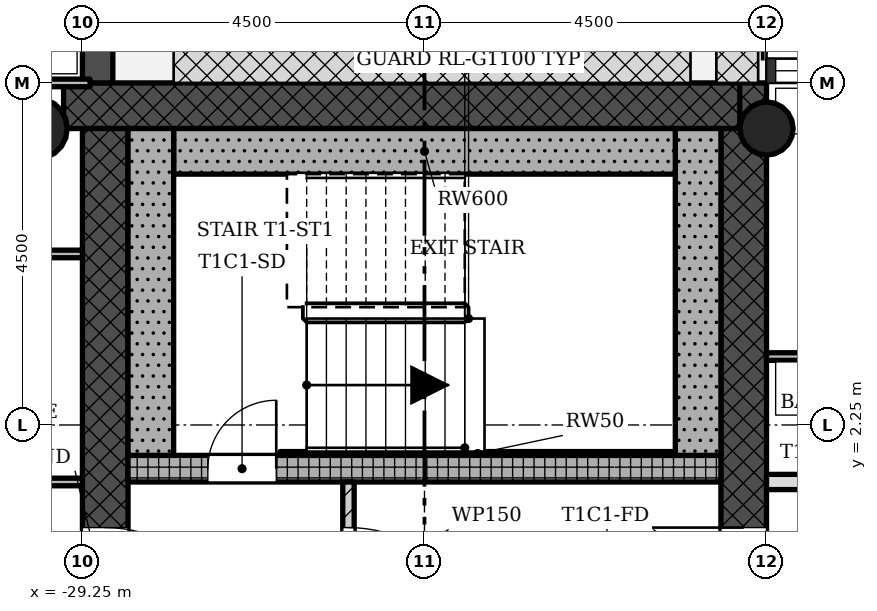
"""IFC4 building model, lengths in metres.
Left out: names, types, materials, properties, quantities, classifications, styles, units other than length and angle.
Written with IfcOpenShell. Run it as: python <this file> out.ifc"""

import sys

from ifc_helpers import new_model, si_unit, direction, frame, frame_2d, origin, origin_2d, place, context, subcontext, project, spatial, rectangle, hollow_circle, extrude, element, fill, save


model = new_model("IFC4")
c1 = context("Model", 3, precision=1e-05, world=origin(), true_north=direction((0.0, 1.0)))
c2 = subcontext(c1, "Body", "Model", "MODEL_VIEW")
j1 = project(units=[si_unit("LENGTHUNIT", "METRE"), si_unit("PLANEANGLEUNIT", "RADIAN")], contexts=[c1])
p1 = place(None, origin())
s1 = spatial("IfcSite", under=j1, at=p1, CompositionType="ELEMENT")
p2 = place(p1, origin())
s2 = spatial("IfcBuilding", under=s1, at=p2, CompositionType="ELEMENT")
p3 = place(p2, frame((0.0, 0.0, 206.2)))
s3 = spatial("IfcBuildingStorey", under=s2, at=p3, CompositionType="ELEMENT", Elevation=206.2)
p4 = place(p3, frame((-20.55, -6.15, 0.0), z_axis=(0.0, 0.0, 1.0), x_axis=(0.0, 1.0, 0.0)))
e1 = element("IfcWall", 1, at=p4, inside=s3, PredefinedType="SHEAR", context=c2, shape_type="SweptSolid", body=[
    extrude(rectangle(XDim=12.9, YDim=0.6, at=frame_2d((6.45, 0.0))), origin(), (0.0, 0.0, 1.0), 3.4),
])
p5 = place(p4, frame((5.25, 0.0, 0.0)))
e2 = element("IfcOpeningElement", 2, at=p5, cuts=e1, PredefinedType="OPENING", context=c2, shape_type="SweptSolid", body=[
    extrude(rectangle(XDim=1.8, YDim=2.1, at=frame_2d((0.9, 1.05))), frame((0.0, 0.31, 0.0), z_axis=(0.0, -1.0, 0.0), x_axis=(1.0, 0.0, 0.0)), (0.0, 0.0, 1.0), 0.62),
])
p6 = place(p3, frame((-20.602, 6.45, 0.0), z_axis=(0.0, 0.0, 1.0), x_axis=(-1.0, 0.0, 0.0)))
e3 = element("IfcWall", 3, at=p6, inside=s3, PredefinedType="SHEAR", context=c2, shape_type="SweptSolid", body=[
    extrude(rectangle(XDim=8.896, YDim=0.6, at=frame_2d((4.448, 0.0))), origin(), (0.0, 0.0, 1.0), 3.4),
])
p7 = place(p3, frame((-28.95, 6.15, 0.0), z_axis=(0.0, 0.0, 1.0), x_axis=(0.0, -1.0, 0.0)))
e4 = element("IfcWall", 4, at=p7, inside=s3, PredefinedType="SHEAR", context=c2, shape_type="SweptSolid", body=[
    extrude(rectangle(XDim=12.9, YDim=0.6, at=frame_2d((6.45, 0.0))), origin(), (0.0, 0.0, 1.0), 3.4),
])
p8 = place(p7, frame((5.25, 0.0, 0.0)))
e5 = element("IfcOpeningElement", 5, at=p8, cuts=e4, PredefinedType="OPENING", context=c2, shape_type="SweptSolid", body=[
    extrude(rectangle(XDim=1.8, YDim=2.1, at=frame_2d((0.9, 1.05))), frame((0.0, 0.31, 0.0), z_axis=(0.0, -1.0, 0.0), x_axis=(1.0, 0.0, 0.0)), (0.0, 0.0, 1.0), 0.62),
])
p9 = place(p3, frame((-28.65, 1.675, 0.0), z_axis=(0.0, 0.0, 1.0), x_axis=(1.0, 0.0, 0.0)))
e6 = element("IfcWall", 6, at=p9, inside=s3, PredefinedType="SHEAR", context=c2, shape_type="SweptSolid", body=[
    extrude(rectangle(XDim=7.8, YDim=0.35, at=frame_2d((3.9, 0.0))), origin(), (0.0, 0.0, 1.0), 3.4),
])
p10 = place(p9, frame((1.05, 0.0, 0.0)))
e7 = element("IfcOpeningElement", 7, at=p10, cuts=e6, PredefinedType="OPENING", context=c2, shape_type="SweptSolid", body=[
    extrude(rectangle(XDim=0.9, YDim=2.1, at=frame_2d((0.45, 1.05))), frame((0.0, 0.185, 0.0), z_axis=(0.0, -1.0, 0.0), x_axis=(1.0, 0.0, 0.0)), (0.0, 0.0, 1.0), 0.37),
])
p11 = place(p3, frame((-20.25, 6.15, 0.0), z_axis=(0.0, 0.0, 1.0), x_axis=(1.0, 0.0, 0.0)))
e8 = element("IfcColumn", 8, at=p11, inside=s3, PredefinedType="COLUMN", context=c2, shape_type="SweptSolid", body=[
    extrude(hollow_circle(Radius=0.35, WallThickness=0.025, at=origin_2d()), origin(), (0.0, 0.0, 1.0), 3.4),
])
p12 = place(p3, frame((-29.85, 6.15, 0.0), z_axis=(0.0, 0.0, 1.0), x_axis=(1.0, 0.0, 0.0)))
e9 = element("IfcColumn", 9, at=p12, inside=s3, PredefinedType="COLUMN", context=c2, shape_type="SweptSolid", body=[
    extrude(hollow_circle(Radius=0.4, WallThickness=0.028, at=origin_2d()), origin(), (0.0, 0.0, 1.0), 3.4),
])
p13 = place(p3, frame((-29.05, 6.75, -0.02), z_axis=(0.0, 0.0, 1.0), x_axis=(0.0, 1.0, 0.0)))
e10 = element("IfcWall", 10, at=p13, inside=s3, PredefinedType="STANDARD", context=c2, shape_type="SweptSolid", body=[
    extrude(rectangle(XDim=4.5, YDim=0.4, at=frame_2d((2.25, 0.0))), origin(), (0.0, 0.0, 1.0), 3.12),
])
p14 = place(p13, frame((1.35, 0.0, 0.02)))
e11 = element("IfcOpeningElement", 11, at=p14, cuts=e10, PredefinedType="OPENING", context=c2, shape_type="SweptSolid", body=[
    extrude(rectangle(XDim=1.8, YDim=2.1, at=frame_2d((0.9, 1.05))), frame((0.0, 0.21, 0.0), z_axis=(0.0, -1.0, 0.0), x_axis=(1.0, 0.0, 0.0)), (0.0, 0.0, 1.0), 0.42),
])
p15 = place(p3, frame((-25.75, -1.5, 0.0), z_axis=(0.0, 0.0, 1.0), x_axis=(0.0, 1.0, 0.0)))
e12 = element("IfcWall", 12, at=p15, inside=s3, PredefinedType="PARTITIONING", context=c2, shape_type="SweptSolid", body=[
    extrude(rectangle(XDim=3.0, YDim=0.15, at=frame_2d((1.5, 0.0))), origin(), (0.0, 0.0, 1.0), 3.0),
])
p16 = place(p15, frame((0.6, 0.0, 0.0)))
e13 = element("IfcOpeningElement", 13, at=p16, cuts=e12, PredefinedType="OPENING", context=c2, shape_type="SweptSolid", body=[
    extrude(rectangle(XDim=1.8, YDim=2.1, at=frame_2d((0.9, 1.05))), frame((0.0, 0.085, 0.0), z_axis=(0.0, -1.0, 0.0), x_axis=(1.0, 0.0, 0.0)), (0.0, 0.0, 1.0), 0.17),
])
p17 = place(p3, frame((-31.5, 1.5, 0.0), z_axis=(0.0, 0.0, 1.0), x_axis=(1.0, 0.0, 0.0)))
e14 = element("IfcWall", 14, at=p17, inside=s3, PredefinedType="PARTITIONING", context=c2, shape_type="SweptSolid", body=[
    extrude(rectangle(XDim=2.25, YDim=0.1, at=frame_2d((1.125, 0.0))), origin(), (0.0, 0.0, 1.0), 3.0),
])
p18 = place(p3, frame((-20.25, 1.5, 0.0), z_axis=(0.0, 0.0, 1.0), x_axis=(1.0, 0.0, 0.0)))
e15 = element("IfcWall", 15, at=p18, inside=s3, PredefinedType="SOLIDWALL", context=c2, shape_type="SweptSolid", body=[
    extrude(rectangle(XDim=4.5, YDim=0.2, at=frame_2d((2.25, 0.0))), origin(), (0.0, 0.0, 1.0), 3.0),
])
p19 = place(p18, frame((3.0, 0.0, 0.0)))
e16 = element("IfcOpeningElement", 16, at=p19, cuts=e15, PredefinedType="OPENING", context=c2, shape_type="SweptSolid", body=[
    extrude(rectangle(XDim=0.9, YDim=2.1, at=frame_2d((0.45, 1.05))), frame((0.0, 0.11, 0.0), z_axis=(0.0, -1.0, 0.0), x_axis=(1.0, 0.0, 0.0)), (0.0, 0.0, 1.0), 0.22),
])
p20 = place(p3, frame((-20.25, 3.15, 0.0), z_axis=(0.0, 0.0, 1.0), x_axis=(1.0, 0.0, 0.0)))
e17 = element("IfcWall", 17, at=p20, inside=s3, PredefinedType="PARTITIONING", context=c2, shape_type="SweptSolid", body=[
    extrude(rectangle(XDim=4.5, YDim=0.1, at=frame_2d((2.25, 0.0))), origin(), (0.0, 0.0, 1.0), 3.0),
])
p21 = place(p20, frame((3.0, 0.0, 0.0)))
e18 = element("IfcOpeningElement", 18, at=p21, cuts=e17, PredefinedType="OPENING", context=c2, shape_type="SweptSolid", body=[
    extrude(rectangle(XDim=0.9, YDim=2.1, at=frame_2d((0.45, 1.05))), frame((0.0, 0.06, 0.0), z_axis=(0.0, -1.0, 0.0), x_axis=(1.0, 0.0, 0.0)), (0.0, 0.0, 1.0), 0.12),
])
p22 = place(p3, frame((-35.1, 4.5, 0.0), z_axis=(0.0, 0.0, 1.0), x_axis=(1.0, 0.0, 0.0)))
e19 = element("IfcWall", 19, at=p22, inside=s3, PredefinedType="PARTITIONING", context=c2, shape_type="SweptSolid", body=[
    extrude(rectangle(XDim=5.85, YDim=0.1, at=frame_2d((2.925, 0.0))), origin(), (0.0, 0.0, 1.0), 3.0),
])
p23 = place(p22, frame((1.35, 0.0, 0.0)))
e20 = element("IfcOpeningElement", 20, at=p23, cuts=e19, PredefinedType="OPENING", context=c2, shape_type="SweptSolid", body=[
    extrude(rectangle(XDim=0.9, YDim=2.1, at=frame_2d((0.45, 1.05))), frame((0.0, 0.06, 0.0), z_axis=(0.0, -1.0, 0.0), x_axis=(1.0, 0.0, 0.0)), (0.0, 0.0, 1.0), 0.12),
])
p24 = place(p3, frame((-35.1, 6.75, 0.0), z_axis=(0.0, 0.0, 1.0), x_axis=(1.0, 0.0, 0.0)))
e21 = element("IfcWall", 21, at=p24, inside=s3, PredefinedType="PARTITIONING", context=c2, shape_type="SweptSolid", body=[
    extrude(rectangle(XDim=5.95, YDim=0.1, at=frame_2d((2.975, 0.0))), origin(), (0.0, 0.0, 1.0), 3.0),
])
p25 = place(p3, frame((-21.15, 1.85, 0.0), z_axis=(0.0, 0.0, 1.0), x_axis=(0.0, 1.0, 0.0)))
e22 = element("IfcWall", 22, at=p25, inside=s3, PredefinedType="SHEAR", context=c2, shape_type="SweptSolid", body=[
    extrude(rectangle(XDim=4.3, YDim=0.6, at=frame_2d((2.15, 0.0))), origin(), (0.0, 0.0, 1.0), 3.4),
])
p26 = place(p3, frame((-28.05, 5.85, 0.0), z_axis=(0.0, 0.0, 1.0), x_axis=(1.0, 0.0, 0.0)))
e23 = element("IfcWall", 23, at=p26, inside=s3, PredefinedType="SHEAR", context=c2, shape_type="SweptSolid", body=[
    extrude(rectangle(XDim=6.6, YDim=0.6, at=frame_2d((3.3, 0.0))), origin(), (0.0, 0.0, 1.0), 3.4),
])
p27 = place(p3, frame((-28.35, 1.85, 0.0), z_axis=(0.0, 0.0, 1.0), x_axis=(0.0, 1.0, 0.0)))
e24 = element("IfcWall", 24, at=p27, inside=s3, PredefinedType="SHEAR", context=c2, shape_type="SweptSolid", body=[
    extrude(rectangle(XDim=4.3, YDim=0.6, at=frame_2d((2.15, 0.0))), origin(), (0.0, 0.0, 1.0), 3.4),
])
p28 = place(p3, frame((-26.65, 1.875, 0.0), z_axis=(0.0, 0.0, 1.0), x_axis=(1.0, 0.0, 0.0)))
e25 = element("IfcWall", 25, at=p28, inside=s3, PredefinedType="SHEAR", context=c2, shape_type="SweptSolid", body=[
    extrude(rectangle(XDim=5.2, YDim=0.05, at=frame_2d((2.6, 0.0))), origin(), (0.0, 0.0, 1.0), 3.4),
])
p29 = place(p16, origin())
e26 = element("IfcDoor", 26, at=p29, inside=s3, OperationType="SINGLE_SWING_LEFT", PredefinedType="DOOR", context=c2, shape_type="SweptSolid", body=[
    extrude(rectangle(XDim=1.8, YDim=2.1, at=frame_2d((0.9, 1.05))), frame((0.0, 0.025, 0.0), z_axis=(0.0, -1.0, 0.0), x_axis=(1.0, 0.0, 0.0)), (0.0, 0.0, 1.0), 0.05),
])
fill(e13, e26)
p30 = place(p10, origin())
e27 = element("IfcDoor", 27, at=p30, inside=s3, OperationType="SINGLE_SWING_LEFT", PredefinedType="DOOR", context=c2, shape_type="SweptSolid", body=[
    extrude(rectangle(XDim=0.9, YDim=2.1, at=frame_2d((0.45, 1.05))), frame((0.0, 0.025, 0.0), z_axis=(0.0, -1.0, 0.0), x_axis=(1.0, 0.0, 0.0)), (0.0, 0.0, 1.0), 0.05),
])
fill(e7, e27)
p31 = place(p8, origin())
e28 = element("IfcDoor", 28, at=p31, inside=s3, OperationType="SINGLE_SWING_LEFT", PredefinedType="DOOR", context=c2, shape_type="SweptSolid", body=[
    extrude(rectangle(XDim=1.8, YDim=2.1, at=frame_2d((0.9, 1.05))), frame((0.0, 0.025, 0.0), z_axis=(0.0, -1.0, 0.0), x_axis=(1.0, 0.0, 0.0)), (0.0, 0.0, 1.0), 0.05),
])
fill(e5, e28)
p32 = place(p5, origin())
e29 = element("IfcDoor", 29, at=p32, inside=s3, OperationType="SINGLE_SWING_LEFT", PredefinedType="DOOR", context=c2, shape_type="SweptSolid", body=[
    extrude(rectangle(XDim=1.8, YDim=2.1, at=frame_2d((0.9, 1.05))), frame((0.0, 0.025, 0.0), z_axis=(0.0, -1.0, 0.0), x_axis=(1.0, 0.0, 0.0)), (0.0, 0.0, 1.0), 0.05),
])
fill(e2, e29)
save(model, sys.argv[1])
